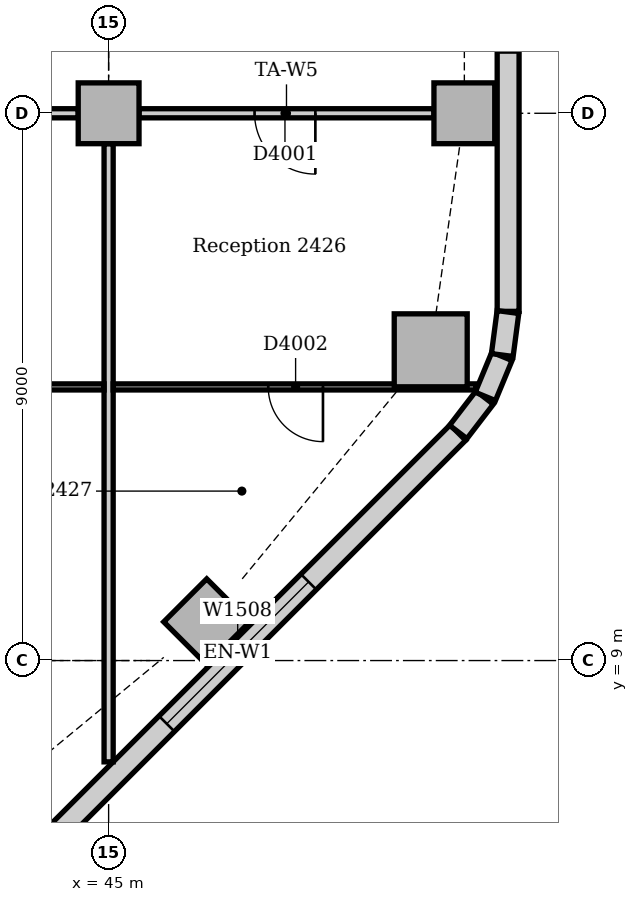
"""IFC4 building model, lengths in metres.
Left out: names, types, materials, properties, quantities, classifications, styles, units other than length and angle.
Written with IfcOpenShell. Run it as: python <this file> out.ifc"""

import sys

from ifc_helpers import new_model, si_unit, direction, frame, frame_2d, origin, origin_2d, place, context, subcontext, project, spatial, rectangle, extrude, element, fill, save


model = new_model("IFC4")
c1 = context("Model", 3, precision=1e-05, world=origin(), true_north=direction((0.0, 1.0)))
c2 = subcontext(c1, "Body", "Model", "MODEL_VIEW")
j1 = project(units=[si_unit("LENGTHUNIT", "METRE"), si_unit("PLANEANGLEUNIT", "RADIAN")], contexts=[c1])
p1 = place(None, origin())
s1 = spatial("IfcSite", under=j1, at=p1, CompositionType="ELEMENT")
p2 = place(p1, origin())
s2 = spatial("IfcBuilding", under=s1, at=p2, CompositionType="ELEMENT")
p3 = place(p2, frame((0.0, 0.0, 104.0)))
s3 = spatial("IfcBuildingStorey", under=s2, at=p3, CompositionType="ELEMENT", Elevation=104.0)
p4 = place(p3, frame((50.297, 14.102, 0.0), z_axis=(0.0, 0.0, 1.0), x_axis=(1.0, 0.0, 0.0)))
e1 = element("IfcColumn", 1, at=p4, inside=s3, PredefinedType="COLUMN", context=c2, shape_type="SweptSolid", body=[
    extrude(rectangle(XDim=1.2, YDim=1.2, at=origin_2d()), origin(), (0.0, 0.0, 1.0), 3.85),
])
for number, where, z_axis, x_axis in (
    (2, (46.614, 9.636, 0.0), (0.0, 0.0, 1.0), (0.707, 0.707, 0.0)),
    (3, (50.85, 18.0, 0.0), (0.0, 0.0, 1.0), (1.0, 0.0, 0.0)),
    (4, (45.0, 18.0, 0.0), (0.0, 0.0, 1.0), (1.0, 0.0, 0.0)),
):
    element("IfcColumn", number, at=place(p3, frame(where, z_axis=z_axis, x_axis=x_axis)), inside=s3, PredefinedType="COLUMN", context=c2, shape_type="SweptSolid", body=[
        extrude(rectangle(XDim=1.0, YDim=1.0, at=origin_2d()), origin(), (0.0, 0.0, 1.0), 3.85),
    ])
p5 = place(p3, frame((43.501, 5.506, 0.0), z_axis=(0.0, 0.0, 1.0), x_axis=(0.707106781187, 0.707106781187, 0.0)))
e5 = element("IfcWall", 5, at=p5, inside=s3, PredefinedType="STANDARD", context=c2, shape_type="SweptSolid", body=[
    extrude(rectangle(XDim=10.243, YDim=0.36, at=frame_2d((5.121, 0.0))), origin(), (0.0, 0.0, 1.0), 3.85),
])
p6 = place(p5, frame((3.471, 0.0, 0.9)))
e6 = element("IfcOpeningElement", 6, at=p6, cuts=e5, PredefinedType="OPENING", context=c2, shape_type="SweptSolid", body=[
    extrude(rectangle(XDim=3.3, YDim=1.6, at=frame_2d((1.65, 0.8))), frame((0.0, 0.19, 0.0), z_axis=(0.0, -1.0, 0.0), x_axis=(1.0, 0.0, 0.0)), (0.0, 0.0, 1.0), 0.38),
])
p7 = place(p3, frame((51.57, 14.743, 0.0), z_axis=(0.0, 0.0, 1.0), x_axis=(0.0, 1.0, 0.0)))
e7 = element("IfcWall", 7, at=p7, inside=s3, PredefinedType="STANDARD", context=c2, shape_type="SweptSolid", body=[
    extrude(rectangle(XDim=24.515, YDim=0.36, at=frame_2d((12.257, 0.0))), origin(), (0.0, 0.0, 1.0), 3.85),
])
p8 = place(p7, frame((4.257, 0.0, 0.9)))
e8 = element("IfcOpeningElement", 8, at=p8, cuts=e7, PredefinedType="OPENING", context=c2, shape_type="SweptSolid", body=[
    extrude(rectangle(XDim=1.8, YDim=1.6, at=frame_2d((0.9, 0.8))), frame((0.0, 0.19, 0.0), z_axis=(0.0, -1.0, 0.0), x_axis=(1.0, 0.0, 0.0)), (0.0, 0.0, 1.0), 0.38),
])
p9 = place(p7, frame((8.357, 0.0, 0.9)))
e9 = element("IfcOpeningElement", 9, at=p9, cuts=e7, PredefinedType="OPENING", context=c2, shape_type="SweptSolid", body=[
    extrude(rectangle(XDim=3.3, YDim=1.6, at=frame_2d((1.65, 0.8))), frame((0.0, 0.19, 0.0), z_axis=(0.0, -1.0, 0.0), x_axis=(1.0, 0.0, 0.0)), (0.0, 0.0, 1.0), 0.38),
])
p10 = place(p7, frame((12.857, 0.0, 0.9)))
e10 = element("IfcOpeningElement", 10, at=p10, cuts=e7, PredefinedType="OPENING", context=c2, shape_type="SweptSolid", body=[
    extrude(rectangle(XDim=3.3, YDim=1.6, at=frame_2d((1.65, 0.8))), frame((0.0, 0.19, 0.0), z_axis=(0.0, -1.0, 0.0), x_axis=(1.0, 0.0, 0.0)), (0.0, 0.0, 1.0), 0.38),
])
p11 = place(p7, frame((17.357, 0.0, 0.9)))
e11 = element("IfcOpeningElement", 11, at=p11, cuts=e7, PredefinedType="OPENING", context=c2, shape_type="SweptSolid", body=[
    extrude(rectangle(XDim=3.3, YDim=1.6, at=frame_2d((1.65, 0.8))), frame((0.0, 0.19, 0.0), z_axis=(0.0, -1.0, 0.0), x_axis=(1.0, 0.0, 0.0)), (0.0, 0.0, 1.0), 0.38),
])
p12 = place(p3, frame((50.75, 12.759, 0.0), z_axis=(0.0, 0.0, 1.0), x_axis=(0.608802368033, 0.793321924995, 0.0)))
e12 = element("IfcWall", 12, at=p12, inside=s3, PredefinedType="STANDARD", context=c2, shape_type="SweptSolid", body=[
    extrude(rectangle(XDim=0.713, YDim=0.36, at=frame_2d((0.357, 0.0))), origin(), (0.0, 0.0, 1.0), 3.85),
])
for number, where, z_axis, x_axis in (
    (13, (51.195, 13.344, 0.0), (0.0, 0.0, 1.0), (0.383, 0.924, 0.0)),
    (14, (51.474, 14.024, 0.0), (0.0, 0.0, 1.0), (0.131, 0.991, 0.0)),
):
    element("IfcWall", number, at=place(p3, frame(where, z_axis=z_axis, x_axis=x_axis)), inside=s3, PredefinedType="STANDARD", context=c2, shape_type="SweptSolid", body=[
        extrude(rectangle(XDim=0.713, YDim=0.36, at=frame_2d((0.356, 0.0))), origin(), (0.0, 0.0, 1.0), 3.85),
    ])
p13 = place(p3, frame((45.5, 18.0, 0.0), z_axis=(0.0, 0.0, 1.0), x_axis=(1.0, 0.0, 0.0)))
e15 = element("IfcWall", 15, at=p13, inside=s3, PredefinedType="PARTITIONING", context=c2, shape_type="SweptSolid", body=[
    extrude(rectangle(XDim=4.85, YDim=0.15, at=frame_2d((2.425, 0.0))), origin(), (0.0, 0.0, 1.0), 3.254),
])
p14 = place(p13, frame((1.9, 0.0, 0.0)))
e16 = element("IfcOpeningElement", 16, at=p14, cuts=e15, PredefinedType="OPENING", context=c2, shape_type="SweptSolid", body=[
    extrude(rectangle(XDim=1.0, YDim=2.1, at=frame_2d((0.5, 1.05))), frame((0.0, 0.085, 0.0), z_axis=(0.0, -1.0, 0.0), x_axis=(1.0, 0.0, 0.0)), (0.0, 0.0, 1.0), 0.17),
])
p15 = place(p3, frame((36.5, 18.0, 0.0), z_axis=(0.0, 0.0, 1.0), x_axis=(1.0, 0.0, 0.0)))
e17 = element("IfcWall", 17, at=p15, inside=s3, PredefinedType="PARTITIONING", context=c2, shape_type="SweptSolid", body=[
    extrude(rectangle(XDim=8.0, YDim=0.15, at=frame_2d((4.0, 0.0))), origin(), (0.0, 0.0, 1.0), 3.158),
])
p16 = place(p15, frame((3.5, 0.0, 0.0)))
e18 = element("IfcOpeningElement", 18, at=p16, cuts=e17, PredefinedType="OPENING", context=c2, shape_type="SweptSolid", body=[
    extrude(rectangle(XDim=1.0, YDim=2.1, at=frame_2d((0.5, 1.05))), frame((0.0, 0.085, 0.0), z_axis=(0.0, -1.0, 0.0), x_axis=(1.0, 0.0, 0.0)), (0.0, 0.0, 1.0), 0.17),
])
p17 = place(p3, frame((45.0, 7.334, 0.0), z_axis=(0.0, 0.0, 1.0), x_axis=(0.0, 1.0, 0.0)))
e19 = element("IfcWall", 19, at=p17, inside=s3, PredefinedType="PARTITIONING", context=c2, shape_type="SweptSolid", body=[
    extrude(rectangle(XDim=10.166, YDim=0.15, at=frame_2d((5.083, 0.0))), origin(), (0.0, 0.0, 1.0), 3.256),
])
p18 = place(p3, frame((31.575, 13.5, 0.0), z_axis=(0.0, 0.0, 1.0), x_axis=(1.0, 0.0, 0.0)))
e20 = element("IfcWall", 20, at=p18, inside=s3, PredefinedType="PARTITIONING", context=c2, shape_type="SweptSolid", body=[
    extrude(rectangle(XDim=13.35, YDim=0.1, at=frame_2d((6.675, 0.0))), origin(), (0.0, 0.0, 1.0), 3.354),
])
p19 = place(p18, frame((2.95, 0.0, 0.0)))
e21 = element("IfcOpeningElement", 21, at=p19, cuts=e20, PredefinedType="OPENING", context=c2, shape_type="SweptSolid", body=[
    extrude(rectangle(XDim=0.9, YDim=2.1, at=frame_2d((0.45, 1.05))), frame((0.0, 0.06, 0.0), z_axis=(0.0, -1.0, 0.0), x_axis=(1.0, 0.0, 0.0)), (0.0, 0.0, 1.0), 0.12),
])
p20 = place(p18, frame((9.475, 0.0, 0.0)))
e22 = element("IfcOpeningElement", 22, at=p20, cuts=e20, PredefinedType="OPENING", context=c2, shape_type="SweptSolid", body=[
    extrude(rectangle(XDim=0.9, YDim=2.1, at=frame_2d((0.45, 1.05))), frame((0.0, 0.06, 0.0), z_axis=(0.0, -1.0, 0.0), x_axis=(1.0, 0.0, 0.0)), (0.0, 0.0, 1.0), 0.12),
])
p21 = place(p3, frame((45.075, 13.5, 0.0), z_axis=(0.0, 0.0, 1.0), x_axis=(1.0, 0.0, 0.0)))
e23 = element("IfcWall", 23, at=p21, inside=s3, PredefinedType="PARTITIONING", context=c2, shape_type="SweptSolid", body=[
    extrude(rectangle(XDim=5.969, YDim=0.1, at=frame_2d((2.985, 0.0))), origin(), (0.0, 0.0, 1.0), 3.454),
])
p22 = place(p21, frame((2.55, 0.0, 0.0)))
e24 = element("IfcOpeningElement", 24, at=p22, cuts=e23, PredefinedType="OPENING", context=c2, shape_type="SweptSolid", body=[
    extrude(rectangle(XDim=0.9, YDim=2.1, at=frame_2d((0.45, 1.05))), frame((0.0, 0.06, 0.0), z_axis=(0.0, -1.0, 0.0), x_axis=(1.0, 0.0, 0.0)), (0.0, 0.0, 1.0), 0.12),
])
p23 = place(p6, origin())
e25 = element("IfcWindow", 25, at=p23, inside=s3, PartitioningType="SINGLE_PANEL", PredefinedType="WINDOW", context=c2, shape_type="SweptSolid", body=[
    extrude(rectangle(XDim=3.3, YDim=1.6, at=frame_2d((1.65, 0.8))), frame((0.0, 0.13, 0.0), z_axis=(0.0, -1.0, 0.0), x_axis=(1.0, 0.0, 0.0)), (0.0, 0.0, 1.0), 0.06),
])
fill(e6, e25)
p24 = place(p14, frame((1.0, 0.0, 0.0), z_axis=(0.0, 0.0, 1.0), x_axis=(-1.0, 0.0, 0.0)))
e26 = element("IfcDoor", 26, at=p24, inside=s3, OperationType="SINGLE_SWING_LEFT", PredefinedType="DOOR", context=c2, shape_type="SweptSolid", body=[
    extrude(rectangle(XDim=1.0, YDim=2.1, at=frame_2d((0.5, 1.05))), frame((0.0, 0.025, 0.0), z_axis=(0.0, -1.0, 0.0), x_axis=(1.0, 0.0, 0.0)), (0.0, 0.0, 1.0), 0.05),
])
fill(e16, e26)
p25 = place(p22, frame((0.9, 0.0, 0.0), z_axis=(0.0, 0.0, 1.0), x_axis=(-1.0, 0.0, 0.0)))
e27 = element("IfcDoor", 27, at=p25, inside=s3, OperationType="SINGLE_SWING_LEFT", PredefinedType="DOOR", context=c2, shape_type="SweptSolid", body=[
    extrude(rectangle(XDim=0.9, YDim=2.1, at=frame_2d((0.45, 1.05))), frame((0.0, 0.025, 0.0), z_axis=(0.0, -1.0, 0.0), x_axis=(1.0, 0.0, 0.0)), (0.0, 0.0, 1.0), 0.05),
])
fill(e24, e27)
save(model, sys.argv[1])
